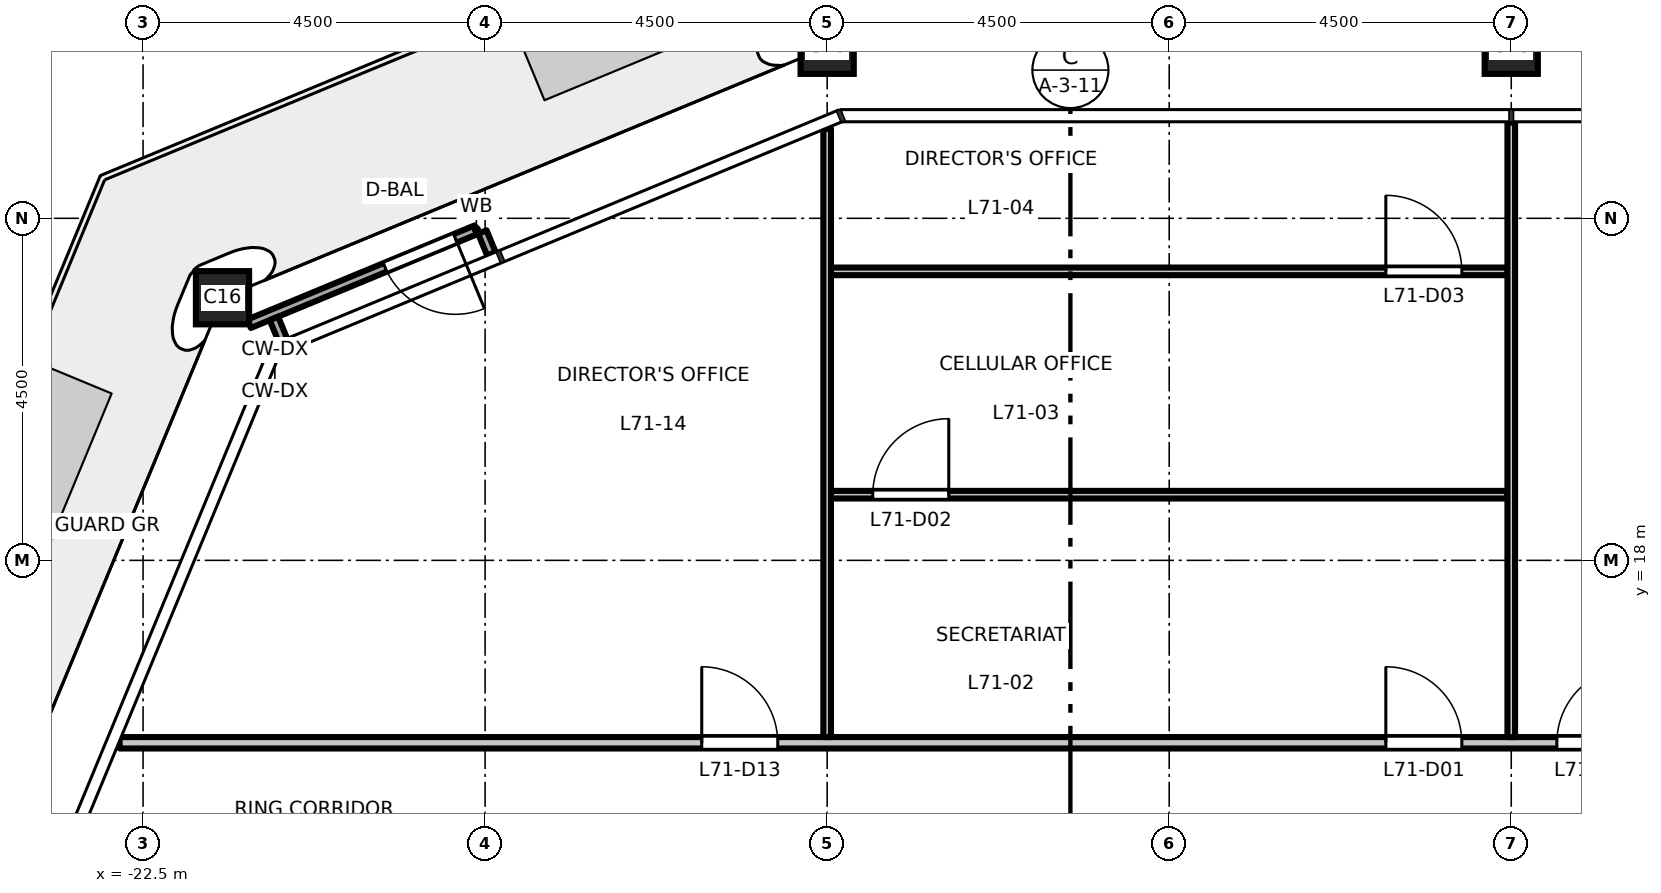
"""IFC4 building model, lengths in metres.
Left out: names, types, materials, properties, quantities, classifications, styles, units other than length and angle.
Written with IfcOpenShell. Run it as: python <this file> out.ifc"""

import sys

from ifc_helpers import new_model, si_unit, direction, frame, frame_2d, origin, origin_2d, place, context, subcontext, project, spatial, rectangle, hollow_rectangle, extrude, element, fill, save


model = new_model("IFC4")
c1 = context("Model", 3, precision=1e-05, world=origin(), true_north=direction((0.0, 1.0)))
c2 = subcontext(c1, "Body", "Model", "MODEL_VIEW")
j1 = project(units=[si_unit("LENGTHUNIT", "METRE"), si_unit("PLANEANGLEUNIT", "RADIAN")], contexts=[c1])
p1 = place(None, origin())
s1 = spatial("IfcSite", under=j1, at=p1, CompositionType="ELEMENT")
p2 = place(p1, origin())
s2 = spatial("IfcBuilding", under=s1, at=p2, CompositionType="ELEMENT")
p3 = place(p2, frame((0.0, 0.0, 330.2)))
s3 = spatial("IfcBuildingStorey", under=s2, at=p3, CompositionType="ELEMENT", Elevation=330.2)
for number, where, z_axis, x_axis in (
    (1, (-4.5, 24.75, 0.0), (0.0, 0.0, 1.0), (1.0, 0.0, 0.0)),
    (2, (-13.5, 24.75, 0.0), (0.0, 0.0, 1.0), (1.0, 0.0, 0.0)),
    (3, (-21.455, 21.455, 0.0), (0.0, 0.0, 1.0), (1.0, 0.0, 0.0)),
):
    element("IfcColumn", number, at=place(p3, frame(where, z_axis=z_axis, x_axis=x_axis)), inside=s3, PredefinedType="COLUMN", context=c2, shape_type="SweptSolid", body=[
        extrude(hollow_rectangle(XDim=0.7, YDim=0.7, WallThickness=0.036, at=origin_2d()), origin(), (0.0, 0.0, 1.0), 4.5),
    ])
p4 = place(p3, frame((-17.917, 22.033, 0.0), z_axis=(0.0, 0.0, 1.0), x_axis=(-0.382769136873, 0.923844027884, 0.0)))
e4 = element("IfcWall", 4, at=p4, inside=s3, PredefinedType="STANDARD", context=c2, shape_type="SweptSolid", body=[
    extrude(rectangle(XDim=0.31, YDim=0.12, at=frame_2d((0.155, 0.0))), origin(), (0.0, 0.0, 1.0), 4.35),
])
p5 = place(p3, frame((-20.66, 20.896, 0.0), z_axis=(0.0, 0.0, 1.0), x_axis=(-0.382490814953, 0.923959293734, 0.0)))
e5 = element("IfcWall", 5, at=p5, inside=s3, PredefinedType="STANDARD", context=c2, shape_type="SweptSolid", body=[
    extrude(rectangle(XDim=0.31, YDim=0.12, at=frame_2d((0.155, 0.0))), origin(), (0.0, 0.0, 1.0), 4.35),
])
p6 = place(p3, frame((-18.115, 22.352, 0.0), z_axis=(0.0, 0.0, 1.0), x_axis=(-0.923871583709, -0.382702621907, 0.0)))
e6 = element("IfcWall", 6, at=p6, inside=s3, PredefinedType="STANDARD", context=c2, shape_type="SweptSolid", body=[
    extrude(rectangle(XDim=3.237, YDim=0.12, at=frame_2d((1.618, 0.0))), origin(), (0.0, 0.0, 1.0), 4.35),
])
p7 = place(p6, frame((0.3, 0.0, 0.0)))
e7 = element("IfcOpeningElement", 7, at=p7, cuts=e6, PredefinedType="OPENING", context=c2, shape_type="SweptSolid", body=[
    extrude(rectangle(XDim=1.0, YDim=2.4, at=frame_2d((0.5, 1.2))), frame((0.0, 0.07, 0.0), z_axis=(0.0, -1.0, 0.0), x_axis=(1.0, 0.0, 0.0)), (0.0, 0.0, 1.0), 0.14),
])
p8 = place(p3, frame((-22.808, 15.6, 0.0), z_axis=(0.0, 0.0, 1.0), x_axis=(1.0, 0.0, 0.0)))
e8 = element("IfcWall", 8, at=p8, inside=s3, PredefinedType="PARTITIONING", context=c2, shape_type="SweptSolid", body=[
    extrude(rectangle(XDim=45.616, YDim=0.15, at=frame_2d((22.808, 0.0))), origin(), (0.0, 0.0, 1.0), 4.35),
])
p9 = place(p8, frame((16.658, 0.0, 0.0)))
e9 = element("IfcOpeningElement", 9, at=p9, cuts=e8, PredefinedType="OPENING", context=c2, shape_type="SweptSolid", body=[
    extrude(rectangle(XDim=1.0, YDim=2.1, at=frame_2d((0.5, 1.05))), frame((0.0, 0.085, 0.0), z_axis=(0.0, -1.0, 0.0), x_axis=(1.0, 0.0, 0.0)), (0.0, 0.0, 1.0), 0.17),
])
p10 = place(p8, frame((18.908, 0.0, 0.0)))
e10 = element("IfcOpeningElement", 10, at=p10, cuts=e8, PredefinedType="OPENING", context=c2, shape_type="SweptSolid", body=[
    extrude(rectangle(XDim=1.0, YDim=2.1, at=frame_2d((0.5, 1.05))), frame((0.0, 0.085, 0.0), z_axis=(0.0, -1.0, 0.0), x_axis=(1.0, 0.0, 0.0)), (0.0, 0.0, 1.0), 0.17),
])
p11 = place(p8, frame((34.658, 0.0, 0.0)))
e11 = element("IfcOpeningElement", 11, at=p11, cuts=e8, PredefinedType="OPENING", context=c2, shape_type="SweptSolid", body=[
    extrude(rectangle(XDim=1.0, YDim=2.1, at=frame_2d((0.5, 1.05))), frame((0.0, 0.085, 0.0), z_axis=(0.0, -1.0, 0.0), x_axis=(1.0, 0.0, 0.0)), (0.0, 0.0, 1.0), 0.17),
])
p12 = place(p8, frame((7.658, 0.0, 0.0)))
e12 = element("IfcOpeningElement", 12, at=p12, cuts=e8, PredefinedType="OPENING", context=c2, shape_type="SweptSolid", body=[
    extrude(rectangle(XDim=1.0, YDim=2.1, at=frame_2d((0.5, 1.05))), frame((0.0, 0.085, 0.0), z_axis=(0.0, -1.0, 0.0), x_axis=(1.0, 0.0, 0.0)), (0.0, 0.0, 1.0), 0.17),
])
p13 = place(p8, frame((36.966, 0.0, 0.0)))
e13 = element("IfcOpeningElement", 13, at=p13, cuts=e8, PredefinedType="OPENING", context=c2, shape_type="SweptSolid", body=[
    extrude(rectangle(XDim=1.0, YDim=2.1, at=frame_2d((0.5, 1.05))), frame((0.0, 0.085, 0.0), z_axis=(0.0, -1.0, 0.0), x_axis=(1.0, 0.0, 0.0)), (0.0, 0.0, 1.0), 0.17),
])
p14 = place(p3, frame((-13.45, 18.864, 0.0), z_axis=(0.0, 0.0, 1.0), x_axis=(1.0, 0.0, 0.0)))
e14 = element("IfcWall", 14, at=p14, inside=s3, PredefinedType="PARTITIONING", context=c2, shape_type="SweptSolid", body=[
    extrude(rectangle(XDim=8.9, YDim=0.1, at=frame_2d((4.45, 0.0))), origin(), (0.0, 0.0, 1.0), 4.35),
])
p15 = place(p14, frame((0.55, 0.0, 0.0)))
e15 = element("IfcOpeningElement", 15, at=p15, cuts=e14, PredefinedType="OPENING", context=c2, shape_type="SweptSolid", body=[
    extrude(rectangle(XDim=1.0, YDim=2.1, at=frame_2d((0.5, 1.05))), frame((0.0, 0.06, 0.0), z_axis=(0.0, -1.0, 0.0), x_axis=(1.0, 0.0, 0.0)), (0.0, 0.0, 1.0), 0.12),
])
p16 = place(p3, frame((-13.45, 21.802, 0.0), z_axis=(0.0, 0.0, 1.0), x_axis=(1.0, 0.0, 0.0)))
e16 = element("IfcWall", 16, at=p16, inside=s3, PredefinedType="PARTITIONING", context=c2, shape_type="SweptSolid", body=[
    extrude(rectangle(XDim=8.9, YDim=0.1, at=frame_2d((4.45, 0.0))), origin(), (0.0, 0.0, 1.0), 4.35),
])
p17 = place(p16, frame((7.3, 0.0, 0.0)))
e17 = element("IfcOpeningElement", 17, at=p17, cuts=e16, PredefinedType="OPENING", context=c2, shape_type="SweptSolid", body=[
    extrude(rectangle(XDim=1.0, YDim=2.1, at=frame_2d((0.5, 1.05))), frame((0.0, 0.06, 0.0), z_axis=(0.0, -1.0, 0.0), x_axis=(1.0, 0.0, 0.0)), (0.0, 0.0, 1.0), 0.12),
])
p18 = place(p3, frame((-13.5, 15.675, 0.0), z_axis=(0.0, 0.0, 1.0), x_axis=(0.0, 1.0, 0.0)))
e18 = element("IfcWall", 18, at=p18, inside=s3, PredefinedType="PARTITIONING", context=c2, shape_type="SweptSolid", body=[
    extrude(rectangle(XDim=8.003, YDim=0.1, at=frame_2d((4.001, 0.0))), origin(), (0.0, 0.0, 1.0), 3.75),
])
p19 = place(p3, frame((-4.5, 15.675, 0.0), z_axis=(0.0, 0.0, 1.0), x_axis=(0.0, 1.0, 0.0)))
e19 = element("IfcWall", 19, at=p19, inside=s3, PredefinedType="PARTITIONING", context=c2, shape_type="SweptSolid", body=[
    extrude(rectangle(XDim=8.085, YDim=0.1, at=frame_2d((4.042, 0.0))), origin(), (0.0, 0.0, 1.0), 3.65),
])
p20 = place(p7, origin())
e20 = element("IfcDoor", 20, at=p20, inside=s3, OperationType="SINGLE_SWING_LEFT", PredefinedType="DOOR", context=c2, shape_type="SweptSolid", body=[
    extrude(rectangle(XDim=1.0, YDim=2.4, at=frame_2d((0.5, 1.2))), frame((0.0, 0.025, 0.0), z_axis=(0.0, -1.0, 0.0), x_axis=(1.0, 0.0, 0.0)), (0.0, 0.0, 1.0), 0.05),
])
fill(e7, e20)
p21 = place(p9, origin())
e21 = element("IfcDoor", 21, at=p21, inside=s3, OperationType="SINGLE_SWING_LEFT", PredefinedType="DOOR", context=c2, shape_type="SweptSolid", body=[
    extrude(rectangle(XDim=1.0, YDim=2.1, at=frame_2d((0.5, 1.05))), frame((0.0, 0.025, 0.0), z_axis=(0.0, -1.0, 0.0), x_axis=(1.0, 0.0, 0.0)), (0.0, 0.0, 1.0), 0.05),
])
fill(e9, e21)
p22 = place(p15, origin())
e22 = element("IfcDoor", 22, at=p22, inside=s3, OperationType="SINGLE_SWING_RIGHT", PredefinedType="DOOR", context=c2, shape_type="SweptSolid", body=[
    extrude(rectangle(XDim=1.0, YDim=2.1, at=frame_2d((0.5, 1.05))), frame((0.0, 0.025, 0.0), z_axis=(0.0, -1.0, 0.0), x_axis=(1.0, 0.0, 0.0)), (0.0, 0.0, 1.0), 0.05),
])
fill(e15, e22)
p23 = place(p17, origin())
e23 = element("IfcDoor", 23, at=p23, inside=s3, OperationType="SINGLE_SWING_LEFT", PredefinedType="DOOR", context=c2, shape_type="SweptSolid", body=[
    extrude(rectangle(XDim=1.0, YDim=2.1, at=frame_2d((0.5, 1.05))), frame((0.0, 0.025, 0.0), z_axis=(0.0, -1.0, 0.0), x_axis=(1.0, 0.0, 0.0)), (0.0, 0.0, 1.0), 0.05),
])
fill(e17, e23)
p24 = place(p10, origin())
e24 = element("IfcDoor", 24, at=p24, inside=s3, OperationType="SINGLE_SWING_RIGHT", PredefinedType="DOOR", context=c2, shape_type="SweptSolid", body=[
    extrude(rectangle(XDim=1.0, YDim=2.1, at=frame_2d((0.5, 1.05))), frame((0.0, 0.025, 0.0), z_axis=(0.0, -1.0, 0.0), x_axis=(1.0, 0.0, 0.0)), (0.0, 0.0, 1.0), 0.05),
])
fill(e10, e24)
p25 = place(p12, origin())
e25 = element("IfcDoor", 25, at=p25, inside=s3, OperationType="SINGLE_SWING_LEFT", PredefinedType="DOOR", context=c2, shape_type="SweptSolid", body=[
    extrude(rectangle(XDim=1.0, YDim=2.1, at=frame_2d((0.5, 1.05))), frame((0.0, 0.025, 0.0), z_axis=(0.0, -1.0, 0.0), x_axis=(1.0, 0.0, 0.0)), (0.0, 0.0, 1.0), 0.05),
])
fill(e12, e25)
save(model, sys.argv[1])
